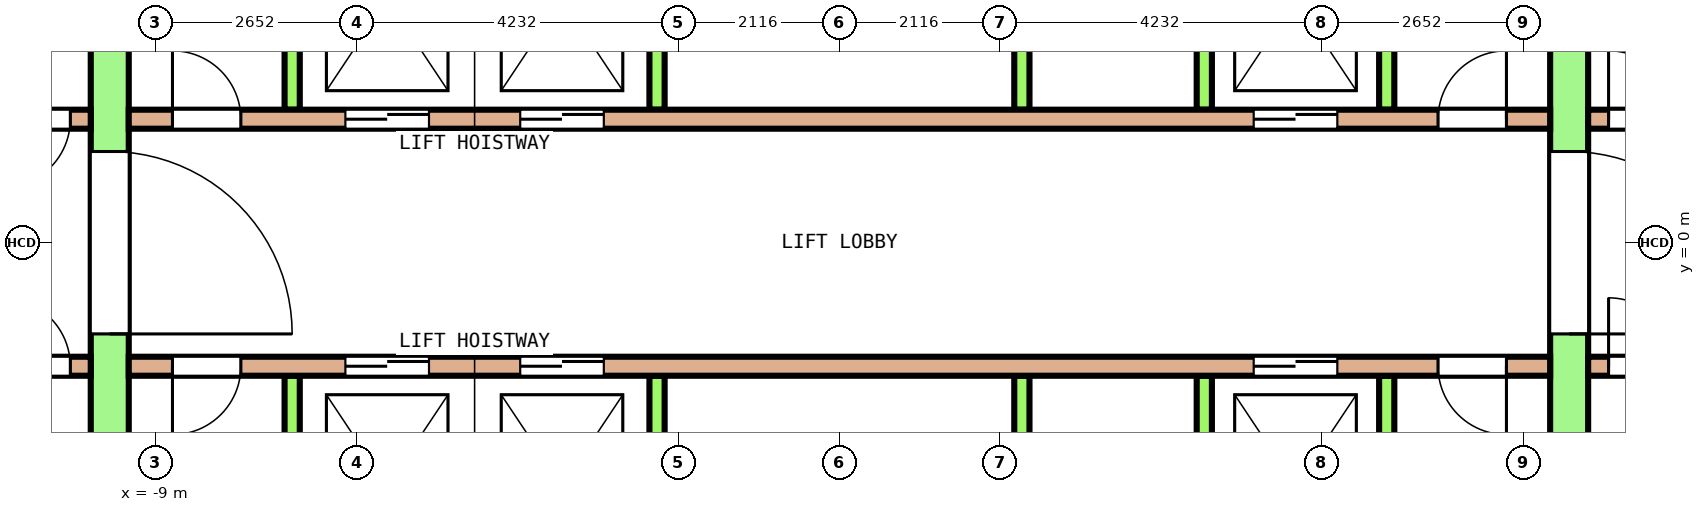
"""IFC4 building model, lengths in metres.
Left out: names, types, materials, properties, quantities, classifications, styles, units other than length and angle.
Written with IfcOpenShell. Run it as: python <this file> out.ifc"""

import sys

from ifc_helpers import new_model, si_unit, direction, frame, frame_2d, origin, place, context, subcontext, project, spatial, rectangle, extrude, element, fill, save


model = new_model("IFC4")
c1 = context("Model", 3, precision=1e-05, world=origin(), true_north=direction((0.0, 1.0)))
c2 = subcontext(c1, "Body", "Model", "MODEL_VIEW")
j1 = project(units=[si_unit("LENGTHUNIT", "METRE"), si_unit("PLANEANGLEUNIT", "RADIAN")], contexts=[c1])
p1 = place(None, origin())
s1 = spatial("IfcSite", under=j1, at=p1, CompositionType="ELEMENT")
p2 = place(p1, origin())
s2 = spatial("IfcBuilding", under=s1, at=p2, CompositionType="ELEMENT")
p3 = place(p2, frame((0.0, 0.0, 167.2)))
s3 = spatial("IfcBuildingStorey", under=s2, at=p3, CompositionType="ELEMENT", Elevation=167.2)
p4 = place(p3, frame((-9.6, -7.75, 0.0), z_axis=(0.0, 0.0, 1.0), x_axis=(0.0, 1.0, 0.0)))
e1 = element("IfcWall", 1, at=p4, inside=s3, PredefinedType="SHEAR", context=c2, shape_type="SweptSolid", body=[
    extrude(rectangle(XDim=15.5, YDim=0.5, at=frame_2d((7.75, 0.0))), origin(), (0.0, 0.0, 1.0), 4.1),
])
p5 = place(p4, frame((6.55, 0.0, 0.0)))
e2 = element("IfcOpeningElement", 2, at=p5, cuts=e1, PredefinedType="OPENING", context=c2, shape_type="SweptSolid", body=[
    extrude(rectangle(XDim=2.4, YDim=2.1, at=frame_2d((1.2, 1.05))), frame((0.0, 0.26, 0.0), z_axis=(0.0, -1.0, 0.0), x_axis=(1.0, 0.0, 0.0)), (0.0, 0.0, 1.0), 0.52),
])
p6 = place(p4, frame((13.45, 0.0, 0.0)))
e3 = element("IfcOpeningElement", 3, at=p6, cuts=e1, PredefinedType="OPENING", context=c2, shape_type="SweptSolid", body=[
    extrude(rectangle(XDim=1.2, YDim=2.1, at=frame_2d((0.6, 1.05))), frame((0.0, 0.26, 0.0), z_axis=(0.0, -1.0, 0.0), x_axis=(1.0, 0.0, 0.0)), (0.0, 0.0, 1.0), 0.52),
])
p7 = place(p4, frame((0.85, 0.0, 0.0)))
e4 = element("IfcOpeningElement", 4, at=p7, cuts=e1, PredefinedType="OPENING", context=c2, shape_type="SweptSolid", body=[
    extrude(rectangle(XDim=1.2, YDim=2.1, at=frame_2d((0.6, 1.05))), frame((0.0, 0.26, 0.0), z_axis=(0.0, -1.0, 0.0), x_axis=(1.0, 0.0, 0.0)), (0.0, 0.0, 1.0), 0.52),
])
p8 = place(p3, frame((9.6, -7.75, 0.0), z_axis=(0.0, 0.0, 1.0), x_axis=(0.0, 1.0, 0.0)))
e5 = element("IfcWall", 5, at=p8, inside=s3, PredefinedType="SHEAR", context=c2, shape_type="SweptSolid", body=[
    extrude(rectangle(XDim=15.5, YDim=0.5, at=frame_2d((7.75, 0.0))), origin(), (0.0, 0.0, 1.0), 4.1),
])
p9 = place(p8, frame((6.55, 0.0, 0.0)))
e6 = element("IfcOpeningElement", 6, at=p9, cuts=e5, PredefinedType="OPENING", context=c2, shape_type="SweptSolid", body=[
    extrude(rectangle(XDim=2.4, YDim=2.1, at=frame_2d((1.2, 1.05))), frame((0.0, 0.26, 0.0), z_axis=(0.0, -1.0, 0.0), x_axis=(1.0, 0.0, 0.0)), (0.0, 0.0, 1.0), 0.52),
])
p10 = place(p8, frame((13.45, 0.0, 0.0)))
e7 = element("IfcOpeningElement", 7, at=p10, cuts=e5, PredefinedType="OPENING", context=c2, shape_type="SweptSolid", body=[
    extrude(rectangle(XDim=1.2, YDim=2.1, at=frame_2d((0.6, 1.05))), frame((0.0, 0.26, 0.0), z_axis=(0.0, -1.0, 0.0), x_axis=(1.0, 0.0, 0.0)), (0.0, 0.0, 1.0), 0.52),
])
p11 = place(p8, frame((0.95, 0.0, 0.0)))
e8 = element("IfcOpeningElement", 8, at=p11, cuts=e5, PredefinedType="OPENING", context=c2, shape_type="SweptSolid", body=[
    extrude(rectangle(XDim=1.0, YDim=2.1, at=frame_2d((0.5, 1.05))), frame((0.0, 0.26, 0.0), z_axis=(0.0, -1.0, 0.0), x_axis=(1.0, 0.0, 0.0)), (0.0, 0.0, 1.0), 0.52),
])
p12 = place(p3, frame((-12.85, 1.625, 0.0), z_axis=(0.0, 0.0, 1.0), x_axis=(1.0, 0.0, 0.0)))
e9 = element("IfcWall", 9, at=p12, inside=s3, PredefinedType="SOLIDWALL", context=c2, shape_type="SweptSolid", body=[
    extrude(rectangle(XDim=3.0, YDim=0.25, at=frame_2d((1.5, 0.0))), origin(), (0.0, 0.0, 1.0), 4.1),
])
p13 = place(p12, frame((0.269, 0.0, 0.0)))
e10 = element("IfcOpeningElement", 10, at=p13, cuts=e9, PredefinedType="OPENING", context=c2, shape_type="SweptSolid", body=[
    extrude(rectangle(XDim=0.9, YDim=2.1, at=frame_2d((0.45, 1.05))), frame((0.0, 0.135, 0.0), z_axis=(0.0, -1.0, 0.0), x_axis=(1.0, 0.0, 0.0)), (0.0, 0.0, 1.0), 0.27),
])
p14 = place(p12, frame((1.831, 0.0, 0.0)))
e11 = element("IfcOpeningElement", 11, at=p14, cuts=e9, PredefinedType="OPENING", context=c2, shape_type="SweptSolid", body=[
    extrude(rectangle(XDim=0.9, YDim=2.1, at=frame_2d((0.45, 1.05))), frame((0.0, 0.135, 0.0), z_axis=(0.0, -1.0, 0.0), x_axis=(1.0, 0.0, 0.0)), (0.0, 0.0, 1.0), 0.27),
])
p15 = place(p3, frame((-9.35, 1.625, 0.0), z_axis=(0.0, 0.0, 1.0), x_axis=(1.0, 0.0, 0.0)))
e12 = element("IfcWall", 12, at=p15, inside=s3, PredefinedType="SOLIDWALL", context=c2, shape_type="SweptSolid", body=[
    extrude(rectangle(XDim=18.7, YDim=0.25, at=frame_2d((9.35, 0.0))), origin(), (0.0, 0.0, 1.0), 4.1),
])
p16 = place(p15, frame((2.85, 0.0, 0.0)))
e13 = element("IfcOpeningElement", 13, at=p16, cuts=e12, PredefinedType="OPENING", context=c2, shape_type="SweptSolid", body=[
    extrude(rectangle(XDim=1.1, YDim=2.1, at=frame_2d((0.55, 1.05))), frame((0.0, 0.135, 0.0), z_axis=(0.0, -1.0, 0.0), x_axis=(1.0, 0.0, 0.0)), (0.0, 0.0, 1.0), 0.27),
])
p17 = place(p15, frame((5.15, 0.0, 0.0)))
e14 = element("IfcOpeningElement", 14, at=p17, cuts=e12, PredefinedType="OPENING", context=c2, shape_type="SweptSolid", body=[
    extrude(rectangle(XDim=1.1, YDim=2.1, at=frame_2d((0.55, 1.05))), frame((0.0, 0.135, 0.0), z_axis=(0.0, -1.0, 0.0), x_axis=(1.0, 0.0, 0.0)), (0.0, 0.0, 1.0), 0.27),
])
p18 = place(p15, frame((14.8, 0.0, 0.0)))
e15 = element("IfcOpeningElement", 15, at=p18, cuts=e12, PredefinedType="OPENING", context=c2, shape_type="SweptSolid", body=[
    extrude(rectangle(XDim=1.1, YDim=2.1, at=frame_2d((0.55, 1.05))), frame((0.0, 0.135, 0.0), z_axis=(0.0, -1.0, 0.0), x_axis=(1.0, 0.0, 0.0)), (0.0, 0.0, 1.0), 0.27),
])
p19 = place(p15, frame((0.575, 0.0, 0.0)))
e16 = element("IfcOpeningElement", 16, at=p19, cuts=e12, PredefinedType="OPENING", context=c2, shape_type="SweptSolid", body=[
    extrude(rectangle(XDim=0.9, YDim=2.1, at=frame_2d((0.45, 1.05))), frame((0.0, 0.135, 0.0), z_axis=(0.0, -1.0, 0.0), x_axis=(1.0, 0.0, 0.0)), (0.0, 0.0, 1.0), 0.27),
])
p20 = place(p15, frame((17.225, 0.0, 0.0)))
e17 = element("IfcOpeningElement", 17, at=p20, cuts=e12, PredefinedType="OPENING", context=c2, shape_type="SweptSolid", body=[
    extrude(rectangle(XDim=0.9, YDim=2.1, at=frame_2d((0.45, 1.05))), frame((0.0, 0.135, 0.0), z_axis=(0.0, -1.0, 0.0), x_axis=(1.0, 0.0, 0.0)), (0.0, 0.0, 1.0), 0.27),
])
p21 = place(p3, frame((9.85, 1.625, 0.0), z_axis=(0.0, 0.0, 1.0), x_axis=(1.0, 0.0, 0.0)))
e18 = element("IfcWall", 18, at=p21, inside=s3, PredefinedType="SOLIDWALL", context=c2, shape_type="SweptSolid", body=[
    extrude(rectangle(XDim=3.0, YDim=0.25, at=frame_2d((1.5, 0.0))), origin(), (0.0, 0.0, 1.0), 4.1),
])
p22 = place(p21, frame((0.269, 0.0, 0.0)))
e19 = element("IfcOpeningElement", 19, at=p22, cuts=e18, PredefinedType="OPENING", context=c2, shape_type="SweptSolid", body=[
    extrude(rectangle(XDim=0.9, YDim=2.1, at=frame_2d((0.45, 1.05))), frame((0.0, 0.135, 0.0), z_axis=(0.0, -1.0, 0.0), x_axis=(1.0, 0.0, 0.0)), (0.0, 0.0, 1.0), 0.27),
])
p23 = place(p21, frame((1.831, 0.0, 0.0)))
e20 = element("IfcOpeningElement", 20, at=p23, cuts=e18, PredefinedType="OPENING", context=c2, shape_type="SweptSolid", body=[
    extrude(rectangle(XDim=0.9, YDim=2.1, at=frame_2d((0.45, 1.05))), frame((0.0, 0.135, 0.0), z_axis=(0.0, -1.0, 0.0), x_axis=(1.0, 0.0, 0.0)), (0.0, 0.0, 1.0), 0.27),
])
for number, where, z_axis, x_axis in (
    (21, (-7.2, 1.75, 0.0), (0.0, 0.0, 1.0), (0.0, 1.0, 0.0)),
    (22, (-2.4, 1.75, 0.0), (0.0, 0.0, 1.0), (0.0, 1.0, 0.0)),
    (23, (2.4, 1.75, 0.0), (0.0, 0.0, 1.0), (0.0, 1.0, 0.0)),
    (24, (4.8, 1.75, 0.0), (0.0, 0.0, 1.0), (0.0, 1.0, 0.0)),
    (25, (7.2, 1.75, 0.0), (0.0, 0.0, 1.0), (0.0, 1.0, 0.0)),
):
    element("IfcWall", number, at=place(p3, frame(where, z_axis=z_axis, x_axis=x_axis)), inside=s3, PredefinedType="SOLIDWALL", context=c2, shape_type="SweptSolid", body=[
        extrude(rectangle(XDim=2.9, YDim=0.2, at=frame_2d((1.45, 0.0))), origin(), (0.0, 0.0, 1.0), 4.1),
    ])
p24 = place(p3, frame((-12.85, -1.625, 0.0), z_axis=(0.0, 0.0, 1.0), x_axis=(1.0, 0.0, 0.0)))
e26 = element("IfcWall", 26, at=p24, inside=s3, PredefinedType="SOLIDWALL", context=c2, shape_type="SweptSolid", body=[
    extrude(rectangle(XDim=3.0, YDim=0.25, at=frame_2d((1.5, 0.0))), origin(), (0.0, 0.0, 1.0), 4.1),
])
p25 = place(p24, frame((0.269, 0.0, 0.0)))
e27 = element("IfcOpeningElement", 27, at=p25, cuts=e26, PredefinedType="OPENING", context=c2, shape_type="SweptSolid", body=[
    extrude(rectangle(XDim=0.9, YDim=2.1, at=frame_2d((0.45, 1.05))), frame((0.0, 0.135, 0.0), z_axis=(0.0, -1.0, 0.0), x_axis=(1.0, 0.0, 0.0)), (0.0, 0.0, 1.0), 0.27),
])
p26 = place(p24, frame((1.831, 0.0, 0.0)))
e28 = element("IfcOpeningElement", 28, at=p26, cuts=e26, PredefinedType="OPENING", context=c2, shape_type="SweptSolid", body=[
    extrude(rectangle(XDim=0.9, YDim=2.1, at=frame_2d((0.45, 1.05))), frame((0.0, 0.135, 0.0), z_axis=(0.0, -1.0, 0.0), x_axis=(1.0, 0.0, 0.0)), (0.0, 0.0, 1.0), 0.27),
])
p27 = place(p3, frame((-9.35, -1.625, 0.0), z_axis=(0.0, 0.0, 1.0), x_axis=(1.0, 0.0, 0.0)))
e29 = element("IfcWall", 29, at=p27, inside=s3, PredefinedType="SOLIDWALL", context=c2, shape_type="SweptSolid", body=[
    extrude(rectangle(XDim=18.7, YDim=0.25, at=frame_2d((9.35, 0.0))), origin(), (0.0, 0.0, 1.0), 4.1),
])
p28 = place(p27, frame((2.85, 0.0, 0.0)))
e30 = element("IfcOpeningElement", 30, at=p28, cuts=e29, PredefinedType="OPENING", context=c2, shape_type="SweptSolid", body=[
    extrude(rectangle(XDim=1.1, YDim=2.1, at=frame_2d((0.55, 1.05))), frame((0.0, 0.135, 0.0), z_axis=(0.0, -1.0, 0.0), x_axis=(1.0, 0.0, 0.0)), (0.0, 0.0, 1.0), 0.27),
])
p29 = place(p27, frame((5.15, 0.0, 0.0)))
e31 = element("IfcOpeningElement", 31, at=p29, cuts=e29, PredefinedType="OPENING", context=c2, shape_type="SweptSolid", body=[
    extrude(rectangle(XDim=1.1, YDim=2.1, at=frame_2d((0.55, 1.05))), frame((0.0, 0.135, 0.0), z_axis=(0.0, -1.0, 0.0), x_axis=(1.0, 0.0, 0.0)), (0.0, 0.0, 1.0), 0.27),
])
p30 = place(p27, frame((14.8, 0.0, 0.0)))
e32 = element("IfcOpeningElement", 32, at=p30, cuts=e29, PredefinedType="OPENING", context=c2, shape_type="SweptSolid", body=[
    extrude(rectangle(XDim=1.1, YDim=2.1, at=frame_2d((0.55, 1.05))), frame((0.0, 0.135, 0.0), z_axis=(0.0, -1.0, 0.0), x_axis=(1.0, 0.0, 0.0)), (0.0, 0.0, 1.0), 0.27),
])
p31 = place(p27, frame((0.575, 0.0, 0.0)))
e33 = element("IfcOpeningElement", 33, at=p31, cuts=e29, PredefinedType="OPENING", context=c2, shape_type="SweptSolid", body=[
    extrude(rectangle(XDim=0.9, YDim=2.1, at=frame_2d((0.45, 1.05))), frame((0.0, 0.135, 0.0), z_axis=(0.0, -1.0, 0.0), x_axis=(1.0, 0.0, 0.0)), (0.0, 0.0, 1.0), 0.27),
])
p32 = place(p27, frame((17.225, 0.0, 0.0)))
e34 = element("IfcOpeningElement", 34, at=p32, cuts=e29, PredefinedType="OPENING", context=c2, shape_type="SweptSolid", body=[
    extrude(rectangle(XDim=0.9, YDim=2.1, at=frame_2d((0.45, 1.05))), frame((0.0, 0.135, 0.0), z_axis=(0.0, -1.0, 0.0), x_axis=(1.0, 0.0, 0.0)), (0.0, 0.0, 1.0), 0.27),
])
p33 = place(p3, frame((9.85, -1.625, 0.0), z_axis=(0.0, 0.0, 1.0), x_axis=(1.0, 0.0, 0.0)))
e35 = element("IfcWall", 35, at=p33, inside=s3, PredefinedType="SOLIDWALL", context=c2, shape_type="SweptSolid", body=[
    extrude(rectangle(XDim=3.0, YDim=0.25, at=frame_2d((1.5, 0.0))), origin(), (0.0, 0.0, 1.0), 4.1),
])
p34 = place(p33, frame((0.269, 0.0, 0.0)))
e36 = element("IfcOpeningElement", 36, at=p34, cuts=e35, PredefinedType="OPENING", context=c2, shape_type="SweptSolid", body=[
    extrude(rectangle(XDim=0.9, YDim=2.1, at=frame_2d((0.45, 1.05))), frame((0.0, 0.135, 0.0), z_axis=(0.0, -1.0, 0.0), x_axis=(1.0, 0.0, 0.0)), (0.0, 0.0, 1.0), 0.27),
])
p35 = place(p33, frame((1.831, 0.0, 0.0)))
e37 = element("IfcOpeningElement", 37, at=p35, cuts=e35, PredefinedType="OPENING", context=c2, shape_type="SweptSolid", body=[
    extrude(rectangle(XDim=0.9, YDim=2.1, at=frame_2d((0.45, 1.05))), frame((0.0, 0.135, 0.0), z_axis=(0.0, -1.0, 0.0), x_axis=(1.0, 0.0, 0.0)), (0.0, 0.0, 1.0), 0.27),
])
for number, where, z_axis, x_axis in (
    (38, (-7.2, -4.65, 0.0), (0.0, 0.0, 1.0), (0.0, 1.0, 0.0)),
    (39, (-2.4, -4.65, 0.0), (0.0, 0.0, 1.0), (0.0, 1.0, 0.0)),
    (40, (2.4, -4.65, 0.0), (0.0, 0.0, 1.0), (0.0, 1.0, 0.0)),
    (41, (4.8, -4.65, 0.0), (0.0, 0.0, 1.0), (0.0, 1.0, 0.0)),
    (42, (7.2, -4.65, 0.0), (0.0, 0.0, 1.0), (0.0, 1.0, 0.0)),
):
    element("IfcWall", number, at=place(p3, frame(where, z_axis=z_axis, x_axis=x_axis)), inside=s3, PredefinedType="SOLIDWALL", context=c2, shape_type="SweptSolid", body=[
        extrude(rectangle(XDim=2.9, YDim=0.2, at=frame_2d((1.45, 0.0))), origin(), (0.0, 0.0, 1.0), 4.1),
    ])
p36 = place(p16, origin())
e43 = element("IfcDoor", 43, at=p36, inside=s3, OperationType="DOUBLE_DOOR_SLIDING", PredefinedType="DOOR", context=c2, shape_type="SweptSolid", body=[
    extrude(rectangle(XDim=1.1, YDim=2.1, at=frame_2d((0.55, 1.05))), frame((0.0, 0.075, 0.0), z_axis=(0.0, -1.0, 0.0), x_axis=(1.0, 0.0, 0.0)), (0.0, 0.0, 1.0), 0.15),
])
fill(e13, e43)
p37 = place(p17, origin())
e44 = element("IfcDoor", 44, at=p37, inside=s3, OperationType="DOUBLE_DOOR_SLIDING", PredefinedType="DOOR", context=c2, shape_type="SweptSolid", body=[
    extrude(rectangle(XDim=1.1, YDim=2.1, at=frame_2d((0.55, 1.05))), frame((0.0, 0.075, 0.0), z_axis=(0.0, -1.0, 0.0), x_axis=(1.0, 0.0, 0.0)), (0.0, 0.0, 1.0), 0.15),
])
fill(e14, e44)
p38 = place(p18, origin())
e45 = element("IfcDoor", 45, at=p38, inside=s3, OperationType="DOUBLE_DOOR_SLIDING", PredefinedType="DOOR", context=c2, shape_type="SweptSolid", body=[
    extrude(rectangle(XDim=1.1, YDim=2.1, at=frame_2d((0.55, 1.05))), frame((0.0, 0.075, 0.0), z_axis=(0.0, -1.0, 0.0), x_axis=(1.0, 0.0, 0.0)), (0.0, 0.0, 1.0), 0.15),
])
fill(e15, e45)
p39 = place(p28, origin())
e46 = element("IfcDoor", 46, at=p39, inside=s3, OperationType="DOUBLE_DOOR_SLIDING", PredefinedType="DOOR", context=c2, shape_type="SweptSolid", body=[
    extrude(rectangle(XDim=1.1, YDim=2.1, at=frame_2d((0.55, 1.05))), frame((0.0, 0.075, 0.0), z_axis=(0.0, -1.0, 0.0), x_axis=(1.0, 0.0, 0.0)), (0.0, 0.0, 1.0), 0.15),
])
fill(e30, e46)
p40 = place(p29, origin())
e47 = element("IfcDoor", 47, at=p40, inside=s3, OperationType="DOUBLE_DOOR_SLIDING", PredefinedType="DOOR", context=c2, shape_type="SweptSolid", body=[
    extrude(rectangle(XDim=1.1, YDim=2.1, at=frame_2d((0.55, 1.05))), frame((0.0, 0.075, 0.0), z_axis=(0.0, -1.0, 0.0), x_axis=(1.0, 0.0, 0.0)), (0.0, 0.0, 1.0), 0.15),
])
fill(e31, e47)
p41 = place(p30, origin())
e48 = element("IfcDoor", 48, at=p41, inside=s3, OperationType="DOUBLE_DOOR_SLIDING", PredefinedType="DOOR", context=c2, shape_type="SweptSolid", body=[
    extrude(rectangle(XDim=1.1, YDim=2.1, at=frame_2d((0.55, 1.05))), frame((0.0, 0.075, 0.0), z_axis=(0.0, -1.0, 0.0), x_axis=(1.0, 0.0, 0.0)), (0.0, 0.0, 1.0), 0.15),
])
fill(e32, e48)
p42 = place(p5, origin())
e49 = element("IfcDoor", 49, at=p42, inside=s3, OperationType="DOUBLE_DOOR_SINGLE_SWING", PredefinedType="DOOR", context=c2, shape_type="SweptSolid", body=[
    extrude(rectangle(XDim=2.4, YDim=2.1, at=frame_2d((1.2, 1.05))), frame((0.0, 0.2, 0.0), z_axis=(0.0, -1.0, 0.0), x_axis=(1.0, 0.0, 0.0)), (0.0, 0.0, 1.0), 0.4),
])
fill(e2, e49)
p43 = place(p9, origin())
e50 = element("IfcDoor", 50, at=p43, inside=s3, OperationType="DOUBLE_DOOR_SINGLE_SWING", PredefinedType="DOOR", context=c2, shape_type="SweptSolid", body=[
    extrude(rectangle(XDim=2.4, YDim=2.1, at=frame_2d((1.2, 1.05))), frame((0.0, 0.2, 0.0), z_axis=(0.0, -1.0, 0.0), x_axis=(1.0, 0.0, 0.0)), (0.0, 0.0, 1.0), 0.4),
])
fill(e6, e50)
p44 = place(p14, origin())
e51 = element("IfcDoor", 51, at=p44, inside=s3, OperationType="SINGLE_SWING_RIGHT", PredefinedType="DOOR", context=c2, shape_type="SweptSolid", body=[
    extrude(rectangle(XDim=0.9, YDim=2.1, at=frame_2d((0.45, 1.05))), frame((0.0, 0.075, 0.0), z_axis=(0.0, -1.0, 0.0), x_axis=(1.0, 0.0, 0.0)), (0.0, 0.0, 1.0), 0.15),
])
fill(e11, e51)
p45 = place(p19, origin())
e52 = element("IfcDoor", 52, at=p45, inside=s3, OperationType="SINGLE_SWING_LEFT", PredefinedType="DOOR", context=c2, shape_type="SweptSolid", body=[
    extrude(rectangle(XDim=0.9, YDim=2.1, at=frame_2d((0.45, 1.05))), frame((0.0, 0.075, 0.0), z_axis=(0.0, -1.0, 0.0), x_axis=(1.0, 0.0, 0.0)), (0.0, 0.0, 1.0), 0.15),
])
fill(e16, e52)
p46 = place(p20, origin())
e53 = element("IfcDoor", 53, at=p46, inside=s3, OperationType="SINGLE_SWING_RIGHT", PredefinedType="DOOR", context=c2, shape_type="SweptSolid", body=[
    extrude(rectangle(XDim=0.9, YDim=2.1, at=frame_2d((0.45, 1.05))), frame((0.0, 0.075, 0.0), z_axis=(0.0, -1.0, 0.0), x_axis=(1.0, 0.0, 0.0)), (0.0, 0.0, 1.0), 0.15),
])
fill(e17, e53)
p47 = place(p22, origin())
e54 = element("IfcDoor", 54, at=p47, inside=s3, OperationType="SINGLE_SWING_LEFT", PredefinedType="DOOR", context=c2, shape_type="SweptSolid", body=[
    extrude(rectangle(XDim=0.9, YDim=2.1, at=frame_2d((0.45, 1.05))), frame((0.0, 0.075, 0.0), z_axis=(0.0, -1.0, 0.0), x_axis=(1.0, 0.0, 0.0)), (0.0, 0.0, 1.0), 0.15),
])
fill(e19, e54)
p48 = place(p26, origin())
e55 = element("IfcDoor", 55, at=p48, inside=s3, OperationType="SINGLE_SWING_RIGHT", PredefinedType="DOOR", context=c2, shape_type="SweptSolid", body=[
    extrude(rectangle(XDim=0.9, YDim=2.1, at=frame_2d((0.45, 1.05))), frame((0.0, 0.075, 0.0), z_axis=(0.0, -1.0, 0.0), x_axis=(1.0, 0.0, 0.0)), (0.0, 0.0, 1.0), 0.15),
])
fill(e28, e55)
p49 = place(p31, origin())
e56 = element("IfcDoor", 56, at=p49, inside=s3, OperationType="SINGLE_SWING_LEFT", PredefinedType="DOOR", context=c2, shape_type="SweptSolid", body=[
    extrude(rectangle(XDim=0.9, YDim=2.1, at=frame_2d((0.45, 1.05))), frame((0.0, 0.075, 0.0), z_axis=(0.0, -1.0, 0.0), x_axis=(1.0, 0.0, 0.0)), (0.0, 0.0, 1.0), 0.15),
])
fill(e33, e56)
p50 = place(p32, origin())
e57 = element("IfcDoor", 57, at=p50, inside=s3, OperationType="SINGLE_SWING_RIGHT", PredefinedType="DOOR", context=c2, shape_type="SweptSolid", body=[
    extrude(rectangle(XDim=0.9, YDim=2.1, at=frame_2d((0.45, 1.05))), frame((0.0, 0.075, 0.0), z_axis=(0.0, -1.0, 0.0), x_axis=(1.0, 0.0, 0.0)), (0.0, 0.0, 1.0), 0.15),
])
fill(e34, e57)
p51 = place(p34, origin())
e58 = element("IfcDoor", 58, at=p51, inside=s3, OperationType="SINGLE_SWING_LEFT", PredefinedType="DOOR", context=c2, shape_type="SweptSolid", body=[
    extrude(rectangle(XDim=0.9, YDim=2.1, at=frame_2d((0.45, 1.05))), frame((0.0, 0.075, 0.0), z_axis=(0.0, -1.0, 0.0), x_axis=(1.0, 0.0, 0.0)), (0.0, 0.0, 1.0), 0.15),
])
fill(e36, e58)
save(model, sys.argv[1])
